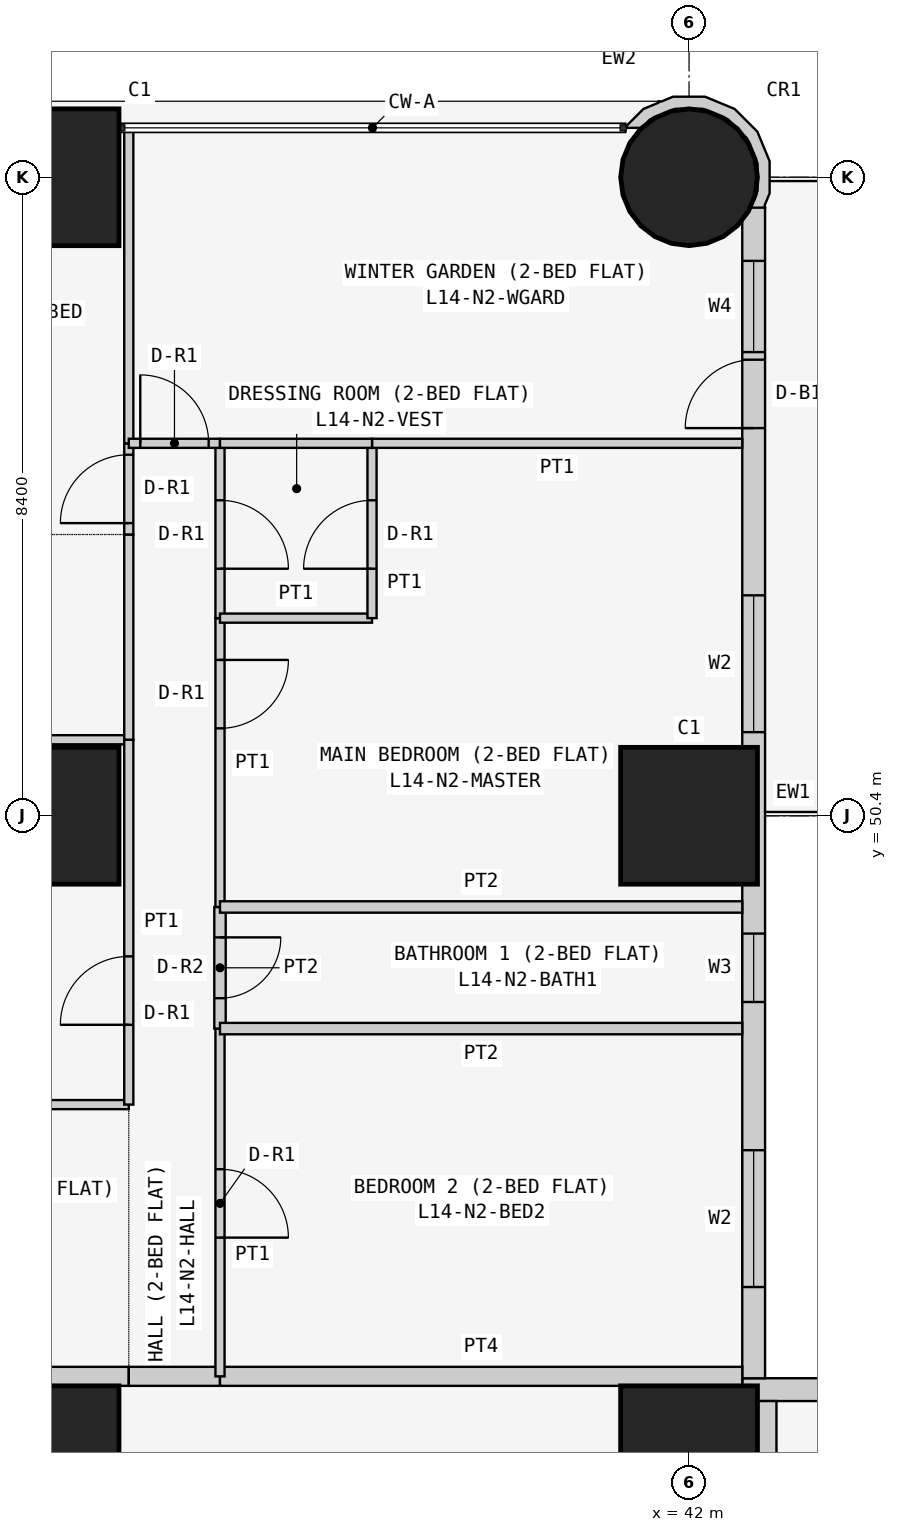
"""IFC4 building model, lengths in metres.
Left out: names, types, materials, properties, quantities, classifications, styles, units other than length and angle.
Written with IfcOpenShell. Run it as: python <this file> out.ifc"""

import sys

from ifc_helpers import new_model, si_unit, direction, frame, frame_2d, origin, origin_2d, place, context, subcontext, project, spatial, polyline, rectangle, circle, outline, extrude, element, fill, save


model = new_model("IFC4")
c1 = context("Model", 3, precision=1e-05, world=origin(), true_north=direction((0.0, 1.0)))
c2 = subcontext(c1, "Body", "Model", "MODEL_VIEW")
j1 = project(units=[si_unit("LENGTHUNIT", "METRE"), si_unit("PLANEANGLEUNIT", "RADIAN")], contexts=[c1])
p1 = place(None, origin())
s1 = spatial("IfcSite", under=j1, at=p1, CompositionType="ELEMENT")
p2 = place(p1, origin())
s2 = spatial("IfcBuilding", under=s1, at=p2, CompositionType="ELEMENT")
p3 = place(p2, frame((0.0, 0.0, 59.7)))
s3 = spatial("IfcBuildingStorey", under=s2, at=p3, CompositionType="ELEMENT", Elevation=59.7)
for number, where, z_axis, x_axis in (
    (1, (33.6, 42.0, 0.0), (0.0, 0.0, 1.0), (1.0, 0.0, 0.0)),
    (2, (33.6, 50.4, 0.0), (0.0, 0.0, 1.0), (1.0, 0.0, 0.0)),
    (3, (33.6, 58.8, 0.0), (0.0, 0.0, 1.0), (1.0, 0.0, 0.0)),
    (4, (42.0, 42.0, 0.0), (0.0, 0.0, 1.0), (1.0, 0.0, 0.0)),
    (5, (42.0, 50.4, 0.0), (0.0, 0.0, 1.0), (1.0, 0.0, 0.0)),
):
    element("IfcColumn", number, at=place(p3, frame(where, z_axis=z_axis, x_axis=x_axis)), inside=s3, PredefinedType="COLUMN", context=c2, shape_type="SweptSolid", body=[
        extrude(rectangle(XDim=1.8, YDim=1.8, at=origin_2d()), origin(), (0.0, 0.0, 1.0), 3.6),
    ])
p4 = place(p3, frame((42.0, 58.8, 0.0), z_axis=(0.0, 0.0, 1.0), x_axis=(1.0, 0.0, 0.0)))
e6 = element("IfcColumn", 6, at=p4, inside=s3, PredefinedType="COLUMN", context=c2, shape_type="SweptSolid", body=[
    extrude(circle(Radius=0.9, at=origin_2d()), origin(), (0.0, 0.0, 1.0), 3.6),
])
p5 = place(p3, frame((58.4, 42.85, 0.0), z_axis=(0.0, 0.0, 1.0), x_axis=(-1.0, 0.0, 0.0)))
e7 = element("IfcWall", 7, at=p5, inside=s3, PredefinedType="SOLIDWALL", context=c2, shape_type="SweptSolid", body=[
    extrude(rectangle(XDim=15.7, YDim=0.3, at=frame_2d((7.85, 0.0))), origin(), (0.0, 0.0, 1.0), 3.45),
])
p6 = place(p5, frame((12.4, 0.0, 0.9)))
e8 = element("IfcOpeningElement", 8, at=p6, cuts=e7, PredefinedType="OPENING", context=c2, shape_type="SweptSolid", body=[
    extrude(rectangle(XDim=1.8, YDim=1.5, at=frame_2d((0.9, 0.75))), frame((0.0, 0.16, 0.0), z_axis=(0.0, -1.0, 0.0), x_axis=(1.0, 0.0, 0.0)), (0.0, 0.0, 1.0), 0.32),
])
p7 = place(p5, frame((9.55, 0.0, 1.5)))
e9 = element("IfcOpeningElement", 9, at=p7, cuts=e7, PredefinedType="OPENING", context=c2, shape_type="SweptSolid", body=[
    extrude(rectangle(XDim=0.9, YDim=0.7, at=frame_2d((0.45, 0.35))), frame((0.0, 0.16, 0.0), z_axis=(0.0, -1.0, 0.0), x_axis=(1.0, 0.0, 0.0)), (0.0, 0.0, 1.0), 0.32),
])
p8 = place(p5, frame((5.1, 0.0, 0.9)))
e10 = element("IfcOpeningElement", 10, at=p8, cuts=e7, PredefinedType="OPENING", context=c2, shape_type="SweptSolid", body=[
    extrude(rectangle(XDim=1.8, YDim=1.5, at=frame_2d((0.9, 0.75))), frame((0.0, 0.16, 0.0), z_axis=(0.0, -1.0, 0.0), x_axis=(1.0, 0.0, 0.0)), (0.0, 0.0, 1.0), 0.32),
])
p9 = place(p5, frame((2.0, 0.0, 0.0)))
e11 = element("IfcOpeningElement", 11, at=p9, cuts=e7, PredefinedType="OPENING", context=c2, shape_type="SweptSolid", body=[
    extrude(rectangle(XDim=0.9, YDim=2.4, at=frame_2d((0.45, 1.2))), frame((0.0, 0.16, 0.0), z_axis=(0.0, -1.0, 0.0), x_axis=(1.0, 0.0, 0.0)), (0.0, 0.0, 1.0), 0.32),
])
p10 = place(p5, frame((0.7, 0.0, 0.9)))
e12 = element("IfcOpeningElement", 12, at=p10, cuts=e7, PredefinedType="OPENING", context=c2, shape_type="SweptSolid", body=[
    extrude(rectangle(XDim=1.2, YDim=1.5, at=frame_2d((0.6, 0.75))), frame((0.0, 0.16, 0.0), z_axis=(0.0, -1.0, 0.0), x_axis=(1.0, 0.0, 0.0)), (0.0, 0.0, 1.0), 0.32),
])
p11 = place(p3, frame((42.85, 43.0, 0.0), z_axis=(0.0, 0.0, 1.0), x_axis=(0.0, 1.0, 0.0)))
e13 = element("IfcWall", 13, at=p11, inside=s3, PredefinedType="SOLIDWALL", context=c2, shape_type="SweptSolid", body=[
    extrude(rectangle(XDim=15.4, YDim=0.3, at=frame_2d((7.7, 0.0))), origin(), (0.0, 0.0, 1.0), 3.45),
])
p12 = place(p11, frame((1.2, 0.0, 0.9)))
e14 = element("IfcOpeningElement", 14, at=p12, cuts=e13, PredefinedType="OPENING", context=c2, shape_type="SweptSolid", body=[
    extrude(rectangle(XDim=1.8, YDim=1.5, at=frame_2d((0.9, 0.75))), frame((0.0, 0.16, 0.0), z_axis=(0.0, -1.0, 0.0), x_axis=(1.0, 0.0, 0.0)), (0.0, 0.0, 1.0), 0.32),
])
p13 = place(p11, frame((4.95, 0.0, 1.5)))
e15 = element("IfcOpeningElement", 15, at=p13, cuts=e13, PredefinedType="OPENING", context=c2, shape_type="SweptSolid", body=[
    extrude(rectangle(XDim=0.9, YDim=0.7, at=frame_2d((0.45, 0.35))), frame((0.0, 0.16, 0.0), z_axis=(0.0, -1.0, 0.0), x_axis=(1.0, 0.0, 0.0)), (0.0, 0.0, 1.0), 0.32),
])
p14 = place(p11, frame((8.5, 0.0, 0.9)))
e16 = element("IfcOpeningElement", 16, at=p14, cuts=e13, PredefinedType="OPENING", context=c2, shape_type="SweptSolid", body=[
    extrude(rectangle(XDim=1.8, YDim=1.5, at=frame_2d((0.9, 0.75))), frame((0.0, 0.16, 0.0), z_axis=(0.0, -1.0, 0.0), x_axis=(1.0, 0.0, 0.0)), (0.0, 0.0, 1.0), 0.32),
])
p15 = place(p11, frame((12.5, 0.0, 0.0)))
e17 = element("IfcOpeningElement", 17, at=p15, cuts=e13, PredefinedType="OPENING", context=c2, shape_type="SweptSolid", body=[
    extrude(rectangle(XDim=0.9, YDim=2.4, at=frame_2d((0.45, 1.2))), frame((0.0, 0.16, 0.0), z_axis=(0.0, -1.0, 0.0), x_axis=(1.0, 0.0, 0.0)), (0.0, 0.0, 1.0), 0.32),
])
p16 = place(p11, frame((13.5, 0.0, 0.9)))
e18 = element("IfcOpeningElement", 18, at=p16, cuts=e13, PredefinedType="OPENING", context=c2, shape_type="SweptSolid", body=[
    extrude(rectangle(XDim=1.2, YDim=1.5, at=frame_2d((0.6, 0.75))), frame((0.0, 0.16, 0.0), z_axis=(0.0, -1.0, 0.0), x_axis=(1.0, 0.0, 0.0)), (0.0, 0.0, 1.0), 0.32),
])
p17 = place(p3, frame((42.91, 58.436, 0.0), z_axis=(0.0, 0.0, 1.0), x_axis=(0.377204953059, 0.926129809145, 0.0)))
e19 = element("IfcWall", 19, at=p17, inside=s3, PredefinedType="SOLIDWALL", context=c2, shape_type="SweptSolid", body=[
    extrude(outline(polyline([(0.769, 1.728), (0.75, 1.723), (0.6, 1.875), (0.295, 2.004), (0.281, 1.998), (0.36, 1.803), (0.509, 1.741), (0.761, 1.486), (0.896, 1.154), (0.894, 0.795), (0.755, 0.465), (0.5, 0.213), (0.168, 0.078), (-0.1, 0.08), (0.001, -0.097), (0.03, -0.08), (0.198, -0.081), (0.589, 0.078), (0.889, 0.374), (1.052, 0.763), (1.055, 1.185), (0.896, 1.575), (0.778, 1.695), (0.769, 1.728)])), origin(), (0.0, 0.0, 1.0), 3.45),
])
p18 = place(p3, frame((29.4, 43.025, 0.0), z_axis=(0.0, 0.0, 1.0), x_axis=(1.0, 0.0, 0.0)))
e20 = element("IfcWall", 20, at=p18, inside=s3, PredefinedType="PARTITIONING", context=c2, shape_type="SweptSolid", body=[
    extrude(rectangle(XDim=5.229, YDim=0.25, at=frame_2d((2.615, 0.0))), origin(), (0.0, 0.0, 1.0), 3.45),
])
p19 = place(p18, frame((2.1, 0.0, 0.0)))
e21 = element("IfcOpeningElement", 21, at=p19, cuts=e20, PredefinedType="OPENING", context=c2, shape_type="SweptSolid", body=[
    extrude(rectangle(XDim=1.0, YDim=2.1, at=frame_2d((0.5, 1.05))), frame((0.0, 0.135, 0.0), z_axis=(0.0, -1.0, 0.0), x_axis=(1.0, 0.0, 0.0)), (0.0, 0.0, 1.0), 0.27),
])
p20 = place(p3, frame((34.629, 43.025, 0.0), z_axis=(0.0, 0.0, 1.0), x_axis=(1.0, 0.0, 0.0)))
e22 = element("IfcWall", 22, at=p20, inside=s3, PredefinedType="PARTITIONING", context=c2, shape_type="SweptSolid", body=[
    extrude(rectangle(XDim=1.2, YDim=0.25, at=frame_2d((0.6, 0.0))), origin(), (0.0, 0.0, 1.0), 3.45),
])
for number, where, z_axis, x_axis in (
    (23, (35.829, 43.025, 0.0), (0.0, 0.0, 1.0), (1.0, 0.0, 0.0)),
    (24, (43.025, 42.7, 0.0), (0.0, 0.0, 1.0), (0.0, -1.0, 0.0)),
):
    element("IfcWall", number, at=place(p3, frame(where, z_axis=z_axis, x_axis=x_axis)), inside=s3, PredefinedType="PARTITIONING", context=c2, shape_type="SweptSolid", body=[
        extrude(rectangle(XDim=6.871, YDim=0.25, at=frame_2d((3.436, 0.0))), origin(), (0.0, 0.0, 1.0), 3.45),
    ])
for number, where, z_axis, x_axis in (
    (25, (29.4, 46.6, 0.0), (0.0, 0.0, 1.0), (1.0, 0.0, 0.0)),
    (26, (29.4, 51.4, 0.0), (0.0, 0.0, 1.0), (1.0, 0.0, 0.0)),
):
    element("IfcWall", number, at=place(p3, frame(where, z_axis=z_axis, x_axis=x_axis)), inside=s3, PredefinedType="PARTITIONING", context=c2, shape_type="SweptSolid", body=[
        extrude(rectangle(XDim=5.229, YDim=0.12, at=frame_2d((2.615, 0.0))), origin(), (0.0, 0.0, 1.0), 3.45),
    ])
p21 = place(p3, frame((34.629, 51.4, 0.0), z_axis=(0.0, 0.0, 1.0), x_axis=(0.0, -1.0, 0.0)))
e27 = element("IfcWall", 27, at=p21, inside=s3, PredefinedType="PARTITIONING", context=c2, shape_type="SweptSolid", body=[
    extrude(rectangle(XDim=4.8, YDim=0.12, at=frame_2d((2.4, 0.0))), origin(), (0.0, 0.0, 1.0), 3.45),
])
p22 = place(p21, frame((2.85, 0.0, 0.0)))
e28 = element("IfcOpeningElement", 28, at=p22, cuts=e27, PredefinedType="OPENING", context=c2, shape_type="SweptSolid", body=[
    extrude(rectangle(XDim=0.9, YDim=2.1, at=frame_2d((0.45, 1.05))), frame((0.0, 0.07, 0.0), z_axis=(0.0, -1.0, 0.0), x_axis=(1.0, 0.0, 0.0)), (0.0, 0.0, 1.0), 0.14),
])
p23 = place(p3, frame((34.629, 54.1, 0.0), z_axis=(0.0, 0.0, 1.0), x_axis=(0.0, -1.0, 0.0)))
e29 = element("IfcWall", 29, at=p23, inside=s3, PredefinedType="PARTITIONING", context=c2, shape_type="SweptSolid", body=[
    extrude(rectangle(XDim=2.7, YDim=0.12, at=frame_2d((1.35, 0.0))), origin(), (0.0, 0.0, 1.0), 3.45),
])
p24 = place(p3, frame((34.629, 55.3, 0.0), z_axis=(0.0, 0.0, 1.0), x_axis=(0.0, -1.0, 0.0)))
e30 = element("IfcWall", 30, at=p24, inside=s3, PredefinedType="PARTITIONING", context=c2, shape_type="SweptSolid", body=[
    extrude(rectangle(XDim=1.2, YDim=0.12, at=frame_2d((0.6, 0.0))), origin(), (0.0, 0.0, 1.0), 3.45),
])
p25 = place(p24, frame((0.15, 0.0, 0.0)))
e31 = element("IfcOpeningElement", 31, at=p25, cuts=e30, PredefinedType="OPENING", context=c2, shape_type="SweptSolid", body=[
    extrude(rectangle(XDim=0.9, YDim=2.1, at=frame_2d((0.45, 1.05))), frame((0.0, 0.07, 0.0), z_axis=(0.0, -1.0, 0.0), x_axis=(1.0, 0.0, 0.0)), (0.0, 0.0, 1.0), 0.14),
])
p26 = place(p3, frame((34.629, 59.45, 0.0), z_axis=(0.0, 0.0, 1.0), x_axis=(0.0, -1.0, 0.0)))
e32 = element("IfcWall", 32, at=p26, inside=s3, PredefinedType="PARTITIONING", context=c2, shape_type="SweptSolid", body=[
    extrude(rectangle(XDim=4.15, YDim=0.12, at=frame_2d((2.075, 0.0))), origin(), (0.0, 0.0, 1.0), 3.45),
])
p27 = place(p3, frame((35.829, 47.6, 0.0), z_axis=(0.0, 0.0, 1.0), x_axis=(0.0, -1.0, 0.0)))
e33 = element("IfcWall", 33, at=p27, inside=s3, PredefinedType="PARTITIONING", context=c2, shape_type="SweptSolid", body=[
    extrude(rectangle(XDim=4.575, YDim=0.12, at=frame_2d((2.288, 0.0))), origin(), (0.0, 0.0, 1.0), 3.45),
])
p28 = place(p27, frame((1.85, 0.0, 0.0)))
e34 = element("IfcOpeningElement", 34, at=p28, cuts=e33, PredefinedType="OPENING", context=c2, shape_type="SweptSolid", body=[
    extrude(rectangle(XDim=0.9, YDim=2.1, at=frame_2d((0.45, 1.05))), frame((0.0, 0.07, 0.0), z_axis=(0.0, -1.0, 0.0), x_axis=(1.0, 0.0, 0.0)), (0.0, 0.0, 1.0), 0.14),
])
p29 = place(p3, frame((35.829, 49.2, 0.0), z_axis=(0.0, 0.0, 1.0), x_axis=(0.0, -1.0, 0.0)))
e35 = element("IfcWall", 35, at=p29, inside=s3, PredefinedType="PARTITIONING", context=c2, shape_type="SweptSolid", body=[
    extrude(rectangle(XDim=1.6, YDim=0.15, at=frame_2d((0.8, 0.0))), origin(), (0.0, 0.0, 1.0), 3.45),
])
p30 = place(p29, frame((0.4, 0.0, 0.0)))
e36 = element("IfcOpeningElement", 36, at=p30, cuts=e35, PredefinedType="OPENING", context=c2, shape_type="SweptSolid", body=[
    extrude(rectangle(XDim=0.8, YDim=2.1, at=frame_2d((0.4, 1.05))), frame((0.0, 0.085, 0.0), z_axis=(0.0, -1.0, 0.0), x_axis=(1.0, 0.0, 0.0)), (0.0, 0.0, 1.0), 0.17),
])
p31 = place(p3, frame((35.829, 53.0, 0.0), z_axis=(0.0, 0.0, 1.0), x_axis=(0.0, -1.0, 0.0)))
e37 = element("IfcWall", 37, at=p31, inside=s3, PredefinedType="PARTITIONING", context=c2, shape_type="SweptSolid", body=[
    extrude(rectangle(XDim=3.8, YDim=0.12, at=frame_2d((1.9, 0.0))), origin(), (0.0, 0.0, 1.0), 3.45),
])
p32 = place(p31, frame((0.55, 0.0, 0.0)))
e38 = element("IfcOpeningElement", 38, at=p32, cuts=e37, PredefinedType="OPENING", context=c2, shape_type="SweptSolid", body=[
    extrude(rectangle(XDim=0.9, YDim=2.1, at=frame_2d((0.45, 1.05))), frame((0.0, 0.07, 0.0), z_axis=(0.0, -1.0, 0.0), x_axis=(1.0, 0.0, 0.0)), (0.0, 0.0, 1.0), 0.14),
])
p33 = place(p3, frame((35.829, 55.3, 0.0), z_axis=(0.0, 0.0, 1.0), x_axis=(0.0, -1.0, 0.0)))
e39 = element("IfcWall", 39, at=p33, inside=s3, PredefinedType="PARTITIONING", context=c2, shape_type="SweptSolid", body=[
    extrude(rectangle(XDim=2.3, YDim=0.12, at=frame_2d((1.15, 0.0))), origin(), (0.0, 0.0, 1.0), 3.45),
])
p34 = place(p33, frame((0.75, 0.0, 0.0)))
e40 = element("IfcOpeningElement", 40, at=p34, cuts=e39, PredefinedType="OPENING", context=c2, shape_type="SweptSolid", body=[
    extrude(rectangle(XDim=0.9, YDim=2.1, at=frame_2d((0.45, 1.05))), frame((0.0, 0.07, 0.0), z_axis=(0.0, -1.0, 0.0), x_axis=(1.0, 0.0, 0.0)), (0.0, 0.0, 1.0), 0.14),
])
p35 = place(p3, frame((34.629, 55.3, 0.0), z_axis=(0.0, 0.0, 1.0), x_axis=(1.0, 0.0, 0.0)))
e41 = element("IfcWall", 41, at=p35, inside=s3, PredefinedType="PARTITIONING", context=c2, shape_type="SweptSolid", body=[
    extrude(rectangle(XDim=1.2, YDim=0.12, at=frame_2d((0.6, 0.0))), origin(), (0.0, 0.0, 1.0), 3.45),
])
p36 = place(p35, frame((0.151, 0.0, 0.0)))
e42 = element("IfcOpeningElement", 42, at=p36, cuts=e41, PredefinedType="OPENING", context=c2, shape_type="SweptSolid", body=[
    extrude(rectangle(XDim=0.9, YDim=2.1, at=frame_2d((0.45, 1.05))), frame((0.0, 0.07, 0.0), z_axis=(0.0, -1.0, 0.0), x_axis=(1.0, 0.0, 0.0)), (0.0, 0.0, 1.0), 0.14),
])
for number, where, z_axis, x_axis in (
    (43, (35.829, 47.6, 0.0), (0.0, 0.0, 1.0), (1.0, 0.0, 0.0)),
    (44, (35.829, 49.2, 0.0), (0.0, 0.0, 1.0), (1.0, 0.0, 0.0)),
):
    element("IfcWall", number, at=place(p3, frame(where, z_axis=z_axis, x_axis=x_axis)), inside=s3, PredefinedType="PARTITIONING", context=c2, shape_type="SweptSolid", body=[
        extrude(rectangle(XDim=6.871, YDim=0.15, at=frame_2d((3.436, 0.0))), origin(), (0.0, 0.0, 1.0), 3.45),
    ])
p37 = place(p3, frame((35.829, 53.0, 0.0), z_axis=(0.0, 0.0, 1.0), x_axis=(1.0, 0.0, 0.0)))
e45 = element("IfcWall", 45, at=p37, inside=s3, PredefinedType="PARTITIONING", context=c2, shape_type="SweptSolid", body=[
    extrude(rectangle(XDim=2.0, YDim=0.12, at=frame_2d((1.0, 0.0))), origin(), (0.0, 0.0, 1.0), 3.45),
])
p38 = place(p3, frame((37.829, 53.0, 0.0), z_axis=(0.0, 0.0, 1.0), x_axis=(0.0, 1.0, 0.0)))
e46 = element("IfcWall", 46, at=p38, inside=s3, PredefinedType="PARTITIONING", context=c2, shape_type="SweptSolid", body=[
    extrude(rectangle(XDim=2.3, YDim=0.12, at=frame_2d((1.15, 0.0))), origin(), (0.0, 0.0, 1.0), 2.848),
])
p39 = place(p38, frame((0.65, 0.0, 0.0)))
e47 = element("IfcOpeningElement", 47, at=p39, cuts=e46, PredefinedType="OPENING", context=c2, shape_type="SweptSolid", body=[
    extrude(rectangle(XDim=0.9, YDim=2.1, at=frame_2d((0.45, 1.05))), frame((0.0, 0.07, 0.0), z_axis=(0.0, -1.0, 0.0), x_axis=(1.0, 0.0, 0.0)), (0.0, 0.0, 1.0), 0.14),
])
p40 = place(p3, frame((37.829, 55.3, 0.0), z_axis=(0.0, 0.0, 1.0), x_axis=(1.0, 0.0, 0.0)))
e48 = element("IfcWall", 48, at=p40, inside=s3, PredefinedType="PARTITIONING", context=c2, shape_type="SweptSolid", body=[
    extrude(rectangle(XDim=4.871, YDim=0.12, at=frame_2d((2.436, 0.0))), origin(), (0.0, 0.0, 1.0), 3.45),
])
p41 = place(p3, frame((35.829, 55.3, 0.0), z_axis=(0.0, 0.0, 1.0), x_axis=(1.0, 0.0, 0.0)))
e49 = element("IfcWall", 49, at=p41, inside=s3, PredefinedType="PARTITIONING", context=c2, shape_type="SweptSolid", body=[
    extrude(rectangle(XDim=2.0, YDim=0.12, at=frame_2d((1.0, 0.0))), origin(), (0.0, 0.0, 1.0), 3.45),
])
p42 = place(p12, origin())
e50 = element("IfcWindow", 50, at=p42, inside=s3, PartitioningType="SINGLE_PANEL", PredefinedType="WINDOW", context=c2, shape_type="SweptSolid", body=[
    extrude(rectangle(XDim=1.8, YDim=1.5, at=frame_2d((0.9, 0.75))), frame((0.0, 0.03, 0.0), z_axis=(0.0, -1.0, 0.0), x_axis=(1.0, 0.0, 0.0)), (0.0, 0.0, 1.0), 0.06),
])
fill(e14, e50)
p43 = place(p13, origin())
e51 = element("IfcWindow", 51, at=p43, inside=s3, PartitioningType="SINGLE_PANEL", PredefinedType="WINDOW", context=c2, shape_type="SweptSolid", body=[
    extrude(rectangle(XDim=0.9, YDim=0.7, at=frame_2d((0.45, 0.35))), frame((0.0, 0.03, 0.0), z_axis=(0.0, -1.0, 0.0), x_axis=(1.0, 0.0, 0.0)), (0.0, 0.0, 1.0), 0.06),
])
fill(e15, e51)
p44 = place(p14, origin())
e52 = element("IfcWindow", 52, at=p44, inside=s3, PartitioningType="SINGLE_PANEL", PredefinedType="WINDOW", context=c2, shape_type="SweptSolid", body=[
    extrude(rectangle(XDim=1.8, YDim=1.5, at=frame_2d((0.9, 0.75))), frame((0.0, 0.03, 0.0), z_axis=(0.0, -1.0, 0.0), x_axis=(1.0, 0.0, 0.0)), (0.0, 0.0, 1.0), 0.06),
])
fill(e16, e52)
p45 = place(p15, origin())
e53 = element("IfcDoor", 53, at=p45, inside=s3, OperationType="SINGLE_SWING_LEFT", PredefinedType="DOOR", context=c2, shape_type="SweptSolid", body=[
    extrude(rectangle(XDim=0.9, YDim=2.4, at=frame_2d((0.45, 1.2))), frame((0.0, 0.025, 0.0), z_axis=(0.0, -1.0, 0.0), x_axis=(1.0, 0.0, 0.0)), (0.0, 0.0, 1.0), 0.05),
])
fill(e17, e53)
p46 = place(p16, origin())
e54 = element("IfcWindow", 54, at=p46, inside=s3, PartitioningType="SINGLE_PANEL", PredefinedType="WINDOW", context=c2, shape_type="SweptSolid", body=[
    extrude(rectangle(XDim=1.2, YDim=1.5, at=frame_2d((0.6, 0.75))), frame((0.0, 0.03, 0.0), z_axis=(0.0, -1.0, 0.0), x_axis=(1.0, 0.0, 0.0)), (0.0, 0.0, 1.0), 0.06),
])
fill(e18, e54)
p47 = place(p22, frame((0.9, 0.0, 0.0), z_axis=(0.0, 0.0, 1.0), x_axis=(-1.0, 0.0, 0.0)))
e55 = element("IfcDoor", 55, at=p47, inside=s3, OperationType="SINGLE_SWING_LEFT", PredefinedType="DOOR", context=c2, shape_type="SweptSolid", body=[
    extrude(rectangle(XDim=0.9, YDim=2.1, at=frame_2d((0.45, 1.05))), frame((0.0, 0.025, 0.0), z_axis=(0.0, -1.0, 0.0), x_axis=(1.0, 0.0, 0.0)), (0.0, 0.0, 1.0), 0.05),
])
fill(e28, e55)
p48 = place(p25, frame((0.9, 0.0, 0.0), z_axis=(0.0, 0.0, 1.0), x_axis=(-1.0, 0.0, 0.0)))
e56 = element("IfcDoor", 56, at=p48, inside=s3, OperationType="SINGLE_SWING_LEFT", PredefinedType="DOOR", context=c2, shape_type="SweptSolid", body=[
    extrude(rectangle(XDim=0.9, YDim=2.1, at=frame_2d((0.45, 1.05))), frame((0.0, 0.025, 0.0), z_axis=(0.0, -1.0, 0.0), x_axis=(1.0, 0.0, 0.0)), (0.0, 0.0, 1.0), 0.05),
])
fill(e31, e56)
p49 = place(p28, origin())
e57 = element("IfcDoor", 57, at=p49, inside=s3, OperationType="SINGLE_SWING_RIGHT", PredefinedType="DOOR", context=c2, shape_type="SweptSolid", body=[
    extrude(rectangle(XDim=0.9, YDim=2.1, at=frame_2d((0.45, 1.05))), frame((0.0, 0.025, 0.0), z_axis=(0.0, -1.0, 0.0), x_axis=(1.0, 0.0, 0.0)), (0.0, 0.0, 1.0), 0.05),
])
fill(e34, e57)
p50 = place(p30, origin())
e58 = element("IfcDoor", 58, at=p50, inside=s3, OperationType="SINGLE_SWING_LEFT", PredefinedType="DOOR", context=c2, shape_type="SweptSolid", body=[
    extrude(rectangle(XDim=0.8, YDim=2.1, at=frame_2d((0.4, 1.05))), frame((0.0, 0.025, 0.0), z_axis=(0.0, -1.0, 0.0), x_axis=(1.0, 0.0, 0.0)), (0.0, 0.0, 1.0), 0.05),
])
fill(e36, e58)
p51 = place(p32, origin())
e59 = element("IfcDoor", 59, at=p51, inside=s3, OperationType="SINGLE_SWING_LEFT", PredefinedType="DOOR", context=c2, shape_type="SweptSolid", body=[
    extrude(rectangle(XDim=0.9, YDim=2.1, at=frame_2d((0.45, 1.05))), frame((0.0, 0.025, 0.0), z_axis=(0.0, -1.0, 0.0), x_axis=(1.0, 0.0, 0.0)), (0.0, 0.0, 1.0), 0.05),
])
fill(e38, e59)
p52 = place(p34, origin())
e60 = element("IfcDoor", 60, at=p52, inside=s3, OperationType="SINGLE_SWING_RIGHT", PredefinedType="DOOR", context=c2, shape_type="SweptSolid", body=[
    extrude(rectangle(XDim=0.9, YDim=2.1, at=frame_2d((0.45, 1.05))), frame((0.0, 0.025, 0.0), z_axis=(0.0, -1.0, 0.0), x_axis=(1.0, 0.0, 0.0)), (0.0, 0.0, 1.0), 0.05),
])
fill(e40, e60)
p53 = place(p39, origin())
e61 = element("IfcDoor", 61, at=p53, inside=s3, OperationType="SINGLE_SWING_LEFT", PredefinedType="DOOR", context=c2, shape_type="SweptSolid", body=[
    extrude(rectangle(XDim=0.9, YDim=2.1, at=frame_2d((0.45, 1.05))), frame((0.0, 0.025, 0.0), z_axis=(0.0, -1.0, 0.0), x_axis=(1.0, 0.0, 0.0)), (0.0, 0.0, 1.0), 0.05),
])
fill(e47, e61)
p54 = place(p36, origin())
e62 = element("IfcDoor", 62, at=p54, inside=s3, OperationType="SINGLE_SWING_LEFT", PredefinedType="DOOR", context=c2, shape_type="SweptSolid", body=[
    extrude(rectangle(XDim=0.9, YDim=2.1, at=frame_2d((0.45, 1.05))), frame((0.0, 0.025, 0.0), z_axis=(0.0, -1.0, 0.0), x_axis=(1.0, 0.0, 0.0)), (0.0, 0.0, 1.0), 0.05),
])
fill(e42, e62)
save(model, sys.argv[1])
